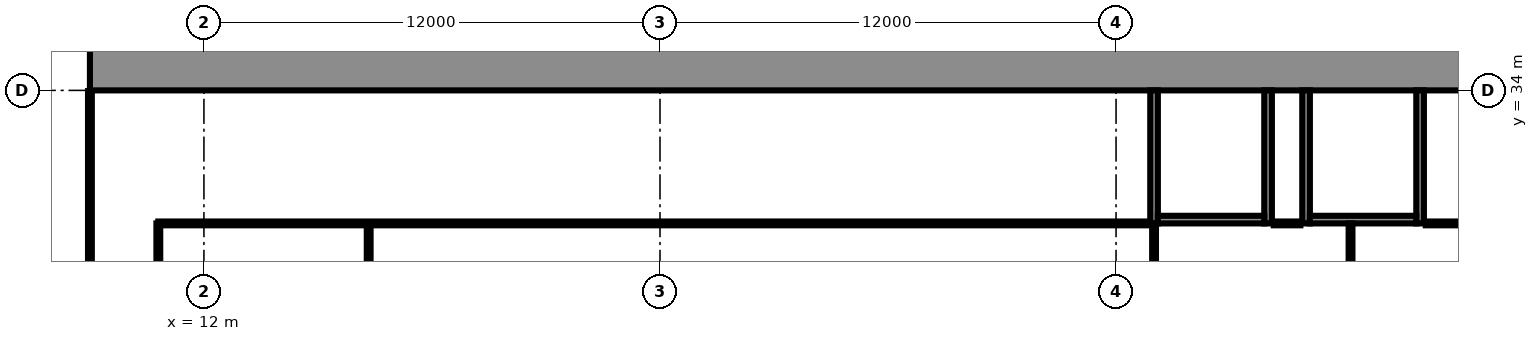
"""IFC4 building model, lengths in metres.
Left out: names, types, materials, properties, quantities, classifications, styles, units other than length and angle.
Written with IfcOpenShell. Run it as: python <this file> out.ifc"""

import sys

from ifc_helpers import new_model, si_unit, direction, frame, frame_2d, origin, place, context, subcontext, project, spatial, rectangle, extrude, element, fill, save


model = new_model("IFC4")
c1 = context("Model", 3, precision=1e-05, world=origin(), true_north=direction((0.0, 1.0)))
c2 = subcontext(c1, "Body", "Model", "MODEL_VIEW")
j1 = project(units=[si_unit("LENGTHUNIT", "METRE"), si_unit("PLANEANGLEUNIT", "RADIAN")], contexts=[c1])
p1 = place(None, origin())
s1 = spatial("IfcSite", under=j1, at=p1, CompositionType="ELEMENT")
p2 = place(p1, origin())
s2 = spatial("IfcBuilding", under=s1, at=p2, CompositionType="ELEMENT")
p3 = place(p2, frame((0.0, 0.0, 41.5)))
s3 = spatial("IfcBuildingStorey", under=s2, at=p3, CompositionType="ELEMENT", Elevation=41.5)
p4 = place(p3, frame((9.0, 34.6, 0.0), z_axis=(0.0, 0.0, 1.0), x_axis=(1.0, 0.0, 0.0)))
e1 = element("IfcWall", 1, at=p4, inside=s3, PredefinedType="SHEAR", context=c2, shape_type="SweptSolid", body=[
    extrude(rectangle(XDim=56.0, YDim=1.2, at=frame_2d((28.0, 0.0))), origin(), (0.0, 0.0, 1.0), 3.6),
])
p5 = place(p4, frame((3.3, 0.0, 0.0)))
e2 = element("IfcOpeningElement", 2, at=p5, cuts=e1, PredefinedType="OPENING", context=c2, shape_type="SweptSolid", body=[
    extrude(rectangle(XDim=1.0, YDim=2.1, at=frame_2d((0.5, 1.05))), frame((0.0, 0.61, 0.0), z_axis=(0.0, -1.0, 0.0), x_axis=(1.0, 0.0, 0.0)), (0.0, 0.0, 1.0), 1.22),
])
p6 = place(p4, frame((7.867, 0.0, 0.0)))
e3 = element("IfcOpeningElement", 3, at=p6, cuts=e1, PredefinedType="OPENING", context=c2, shape_type="SweptSolid", body=[
    extrude(rectangle(XDim=1.1, YDim=2.1, at=frame_2d((0.55, 1.05))), frame((0.0, 0.61, 0.0), z_axis=(0.0, -1.0, 0.0), x_axis=(1.0, 0.0, 0.0)), (0.0, 0.0, 1.0), 1.22),
])
p7 = place(p4, frame((12.033, 0.0, 0.0)))
e4 = element("IfcOpeningElement", 4, at=p7, cuts=e1, PredefinedType="OPENING", context=c2, shape_type="SweptSolid", body=[
    extrude(rectangle(XDim=1.1, YDim=2.1, at=frame_2d((0.55, 1.05))), frame((0.0, 0.61, 0.0), z_axis=(0.0, -1.0, 0.0), x_axis=(1.0, 0.0, 0.0)), (0.0, 0.0, 1.0), 1.22),
])
p8 = place(p4, frame((9.8, 0.0, 0.0)))
e5 = element("IfcOpeningElement", 5, at=p8, cuts=e1, PredefinedType="OPENING", context=c2, shape_type="SweptSolid", body=[
    extrude(rectangle(XDim=1.4, YDim=2.1, at=frame_2d((0.7, 1.05))), frame((0.0, 0.61, 0.0), z_axis=(0.0, -1.0, 0.0), x_axis=(1.0, 0.0, 0.0)), (0.0, 0.0, 1.0), 1.22),
])
p9 = place(p4, frame((14.65, 0.0, 0.0)))
e6 = element("IfcOpeningElement", 6, at=p9, cuts=e1, PredefinedType="OPENING", context=c2, shape_type="SweptSolid", body=[
    extrude(rectangle(XDim=1.2, YDim=2.1, at=frame_2d((0.6, 1.05))), frame((0.0, 0.61, 0.0), z_axis=(0.0, -1.0, 0.0), x_axis=(1.0, 0.0, 0.0)), (0.0, 0.0, 1.0), 1.22),
])
p10 = place(p4, frame((21.867, 0.0, 0.0)))
e7 = element("IfcOpeningElement", 7, at=p10, cuts=e1, PredefinedType="OPENING", context=c2, shape_type="SweptSolid", body=[
    extrude(rectangle(XDim=1.1, YDim=2.1, at=frame_2d((0.55, 1.05))), frame((0.0, 0.61, 0.0), z_axis=(0.0, -1.0, 0.0), x_axis=(1.0, 0.0, 0.0)), (0.0, 0.0, 1.0), 1.22),
])
p11 = place(p4, frame((26.033, 0.0, 0.0)))
e8 = element("IfcOpeningElement", 8, at=p11, cuts=e1, PredefinedType="OPENING", context=c2, shape_type="SweptSolid", body=[
    extrude(rectangle(XDim=1.1, YDim=2.1, at=frame_2d((0.55, 1.05))), frame((0.0, 0.61, 0.0), z_axis=(0.0, -1.0, 0.0), x_axis=(1.0, 0.0, 0.0)), (0.0, 0.0, 1.0), 1.22),
])
p12 = place(p4, frame((23.8, 0.0, 0.0)))
e9 = element("IfcOpeningElement", 9, at=p12, cuts=e1, PredefinedType="OPENING", context=c2, shape_type="SweptSolid", body=[
    extrude(rectangle(XDim=1.4, YDim=2.1, at=frame_2d((0.7, 1.05))), frame((0.0, 0.61, 0.0), z_axis=(0.0, -1.0, 0.0), x_axis=(1.0, 0.0, 0.0)), (0.0, 0.0, 1.0), 1.22),
])
p13 = place(p4, frame((28.867, 0.0, 0.0)))
e10 = element("IfcOpeningElement", 10, at=p13, cuts=e1, PredefinedType="OPENING", context=c2, shape_type="SweptSolid", body=[
    extrude(rectangle(XDim=1.1, YDim=2.1, at=frame_2d((0.55, 1.05))), frame((0.0, 0.61, 0.0), z_axis=(0.0, -1.0, 0.0), x_axis=(1.0, 0.0, 0.0)), (0.0, 0.0, 1.0), 1.22),
])
p14 = place(p4, frame((33.033, 0.0, 0.0)))
e11 = element("IfcOpeningElement", 11, at=p14, cuts=e1, PredefinedType="OPENING", context=c2, shape_type="SweptSolid", body=[
    extrude(rectangle(XDim=1.1, YDim=2.1, at=frame_2d((0.55, 1.05))), frame((0.0, 0.61, 0.0), z_axis=(0.0, -1.0, 0.0), x_axis=(1.0, 0.0, 0.0)), (0.0, 0.0, 1.0), 1.22),
])
p15 = place(p4, frame((40.15, 0.0, 0.0)))
e12 = element("IfcOpeningElement", 12, at=p15, cuts=e1, PredefinedType="OPENING", context=c2, shape_type="SweptSolid", body=[
    extrude(rectangle(XDim=1.2, YDim=2.1, at=frame_2d((0.6, 1.05))), frame((0.0, 0.61, 0.0), z_axis=(0.0, -1.0, 0.0), x_axis=(1.0, 0.0, 0.0)), (0.0, 0.0, 1.0), 1.22),
])
p16 = place(p4, frame((44.8, 0.0, 0.0)))
e13 = element("IfcOpeningElement", 13, at=p16, cuts=e1, PredefinedType="OPENING", context=c2, shape_type="SweptSolid", body=[
    extrude(rectangle(XDim=1.4, YDim=2.1, at=frame_2d((0.7, 1.05))), frame((0.0, 0.61, 0.0), z_axis=(0.0, -1.0, 0.0), x_axis=(1.0, 0.0, 0.0)), (0.0, 0.0, 1.0), 1.22),
])
p17 = place(p4, frame((49.867, 0.0, 0.0)))
e14 = element("IfcOpeningElement", 14, at=p17, cuts=e1, PredefinedType="OPENING", context=c2, shape_type="SweptSolid", body=[
    extrude(rectangle(XDim=1.1, YDim=2.1, at=frame_2d((0.55, 1.05))), frame((0.0, 0.61, 0.0), z_axis=(0.0, -1.0, 0.0), x_axis=(1.0, 0.0, 0.0)), (0.0, 0.0, 1.0), 1.22),
])
p18 = place(p4, frame((53.5, 0.0, 0.0)))
e15 = element("IfcOpeningElement", 15, at=p18, cuts=e1, PredefinedType="OPENING", context=c2, shape_type="SweptSolid", body=[
    extrude(rectangle(XDim=1.1, YDim=2.1, at=frame_2d((0.55, 1.05))), frame((0.0, 0.61, 0.0), z_axis=(0.0, -1.0, 0.0), x_axis=(1.0, 0.0, 0.0)), (0.0, 0.0, 1.0), 1.22),
])
p19 = place(p4, frame((51.567, 0.0, 0.0)))
e16 = element("IfcOpeningElement", 16, at=p19, cuts=e1, PredefinedType="OPENING", context=c2, shape_type="SweptSolid", body=[
    extrude(rectangle(XDim=1.4, YDim=2.1, at=frame_2d((0.7, 1.05))), frame((0.0, 0.61, 0.0), z_axis=(0.0, -1.0, 0.0), x_axis=(1.0, 0.0, 0.0)), (0.0, 0.0, 1.0), 1.22),
])
p20 = place(p3, frame((37.0, 30.5, 0.0), z_axis=(0.0, 0.0, 1.0), x_axis=(0.0, 1.0, 0.0)))
e17 = element("IfcWall", 17, at=p20, inside=s3, PredefinedType="PARTITIONING", context=c2, shape_type="SweptSolid", body=[
    extrude(rectangle(XDim=3.5, YDim=0.2, at=frame_2d((1.75, 0.0))), origin(), (0.0, 0.0, 1.0), 3.2),
])
p21 = place(p20, frame((1.2, 0.0, 0.0)))
e18 = element("IfcOpeningElement", 18, at=p21, cuts=e17, PredefinedType="OPENING", context=c2, shape_type="SweptSolid", body=[
    extrude(rectangle(XDim=1.1, YDim=2.1, at=frame_2d((0.55, 1.05))), frame((0.0, 0.11, 0.0), z_axis=(0.0, -1.0, 0.0), x_axis=(1.0, 0.0, 0.0)), (0.0, 0.0, 1.0), 0.22),
])
p22 = place(p3, frame((40.0, 30.5, 0.0), z_axis=(0.0, 0.0, 1.0), x_axis=(0.0, 1.0, 0.0)))
e19 = element("IfcWall", 19, at=p22, inside=s3, PredefinedType="PARTITIONING", context=c2, shape_type="SweptSolid", body=[
    extrude(rectangle(XDim=3.5, YDim=0.2, at=frame_2d((1.75, 0.0))), origin(), (0.0, 0.0, 1.0), 3.2),
])
p23 = place(p3, frame((37.1, 30.6, 0.0), z_axis=(0.0, 0.0, 1.0), x_axis=(1.0, 0.0, 0.0)))
e20 = element("IfcWall", 20, at=p23, inside=s3, PredefinedType="PARTITIONING", context=c2, shape_type="SweptSolid", body=[
    extrude(rectangle(XDim=2.8, YDim=0.2, at=frame_2d((1.4, 0.0))), origin(), (0.0, 0.0, 1.0), 3.2),
])
p24 = place(p3, frame((41.0, 30.5, 0.0), z_axis=(0.0, 0.0, 1.0), x_axis=(0.0, 1.0, 0.0)))
e21 = element("IfcWall", 21, at=p24, inside=s3, PredefinedType="PARTITIONING", context=c2, shape_type="SweptSolid", body=[
    extrude(rectangle(XDim=3.5, YDim=0.2, at=frame_2d((1.75, 0.0))), origin(), (0.0, 0.0, 1.0), 3.2),
])
p25 = place(p3, frame((44.0, 30.5, 0.0), z_axis=(0.0, 0.0, 1.0), x_axis=(0.0, 1.0, 0.0)))
e22 = element("IfcWall", 22, at=p25, inside=s3, PredefinedType="PARTITIONING", context=c2, shape_type="SweptSolid", body=[
    extrude(rectangle(XDim=3.5, YDim=0.2, at=frame_2d((1.75, 0.0))), origin(), (0.0, 0.0, 1.0), 3.2),
])
p26 = place(p25, frame((1.2, 0.0, 0.0)))
e23 = element("IfcOpeningElement", 23, at=p26, cuts=e22, PredefinedType="OPENING", context=c2, shape_type="SweptSolid", body=[
    extrude(rectangle(XDim=1.1, YDim=2.1, at=frame_2d((0.55, 1.05))), frame((0.0, 0.11, 0.0), z_axis=(0.0, -1.0, 0.0), x_axis=(1.0, 0.0, 0.0)), (0.0, 0.0, 1.0), 0.22),
])
p27 = place(p3, frame((41.1, 30.6, 0.0), z_axis=(0.0, 0.0, 1.0), x_axis=(1.0, 0.0, 0.0)))
e24 = element("IfcWall", 24, at=p27, inside=s3, PredefinedType="PARTITIONING", context=c2, shape_type="SweptSolid", body=[
    extrude(rectangle(XDim=2.8, YDim=0.2, at=frame_2d((1.4, 0.0))), origin(), (0.0, 0.0, 1.0), 3.2),
])
p28 = place(p3, frame((9.0, 26.02, 0.0), z_axis=(0.0, 0.0, 1.0), x_axis=(0.0, 1.0, 0.0)))
e25 = element("IfcWall", 25, at=p28, inside=s3, PredefinedType="PARTITIONING", context=c2, shape_type="SweptSolid", body=[
    extrude(rectangle(XDim=7.96, YDim=0.1, at=frame_2d((3.98, 0.0))), origin(), (0.0, 0.0, 1.0), 3.2),
])
p29 = place(p28, frame((3.56, 0.0, 0.0)))
e26 = element("IfcOpeningElement", 26, at=p29, cuts=e25, PredefinedType="OPENING", context=c2, shape_type="SweptSolid", body=[
    extrude(rectangle(XDim=1.0, YDim=2.1, at=frame_2d((0.5, 1.05))), frame((0.0, 0.06, 0.0), z_axis=(0.0, -1.0, 0.0), x_axis=(1.0, 0.0, 0.0)), (0.0, 0.0, 1.0), 0.12),
])
p30 = place(p3, frame((10.8, 23.55, 0.0), z_axis=(0.0, 0.0, 1.0), x_axis=(0.0, 1.0, 0.0)))
e27 = element("IfcWall", 27, at=p30, inside=s3, PredefinedType="PARTITIONING", context=c2, shape_type="SweptSolid", body=[
    extrude(rectangle(XDim=6.95, YDim=0.1, at=frame_2d((3.475, 0.0))), origin(), (0.0, 0.0, 1.0), 3.2),
])
p31 = place(p30, frame((0.308, 0.0, 0.0)))
e28 = element("IfcOpeningElement", 28, at=p31, cuts=e27, PredefinedType="OPENING", context=c2, shape_type="SweptSolid", body=[
    extrude(rectangle(XDim=1.0, YDim=2.1, at=frame_2d((0.5, 1.05))), frame((0.0, 0.06, 0.0), z_axis=(0.0, -1.0, 0.0), x_axis=(1.0, 0.0, 0.0)), (0.0, 0.0, 1.0), 0.12),
])
p32 = place(p3, frame((10.8, 30.5, 0.0), z_axis=(0.0, 0.0, 1.0), x_axis=(1.0, 0.0, 0.0)))
e29 = element("IfcWall", 29, at=p32, inside=s3, PredefinedType="PARTITIONING", context=c2, shape_type="SweptSolid", body=[
    extrude(rectangle(XDim=26.05, YDim=0.1, at=frame_2d((13.025, 0.0))), origin(), (0.0, 0.0, 1.0), 3.2),
])
p33 = place(p32, frame((0.235, 0.0, 0.0)))
e30 = element("IfcOpeningElement", 30, at=p33, cuts=e29, PredefinedType="OPENING", context=c2, shape_type="SweptSolid", body=[
    extrude(rectangle(XDim=1.0, YDim=2.1, at=frame_2d((0.5, 1.05))), frame((0.0, 0.06, 0.0), z_axis=(0.0, -1.0, 0.0), x_axis=(1.0, 0.0, 0.0)), (0.0, 0.0, 1.0), 0.12),
])
p34 = place(p32, frame((10.955, 0.0, 0.0)))
e31 = element("IfcOpeningElement", 31, at=p34, cuts=e29, PredefinedType="OPENING", context=c2, shape_type="SweptSolid", body=[
    extrude(rectangle(XDim=1.0, YDim=2.1, at=frame_2d((0.5, 1.05))), frame((0.0, 0.06, 0.0), z_axis=(0.0, -1.0, 0.0), x_axis=(1.0, 0.0, 0.0)), (0.0, 0.0, 1.0), 0.12),
])
for number, where, z_axis, x_axis in (
    (32, (16.335, 14.24, 0.0), (0.0, 0.0, 1.0), (0.0, 1.0, 0.0)),
    (33, (20.335, 14.24, 0.0), (0.0, 0.0, 1.0), (0.0, 1.0, 0.0)),
):
    element("IfcWall", number, at=place(p3, frame(where, z_axis=z_axis, x_axis=x_axis)), inside=s3, PredefinedType="PARTITIONING", context=c2, shape_type="SweptSolid", body=[
        extrude(rectangle(XDim=16.26, YDim=0.1, at=frame_2d((8.13, 0.0))), origin(), (0.0, 0.0, 1.0), 3.2),
    ])
p35 = place(p3, frame((24.335, 14.24, 0.0), z_axis=(0.0, 0.0, 1.0), x_axis=(0.0, 1.0, 0.0)))
e34 = element("IfcWall", 34, at=p35, inside=s3, PredefinedType="PARTITIONING", context=c2, shape_type="SweptSolid", body=[
    extrude(rectangle(XDim=16.25, YDim=0.1, at=frame_2d((8.125, 0.0))), origin(), (0.0, 0.0, 1.0), 3.2),
])
for number, where, z_axis, x_axis in (
    (35, (37.0, 14.24, 0.0), (0.0, 0.0, 1.0), (0.0, 1.0, 0.0)),
    (36, (42.17, 14.24, 0.0), (0.0, 0.0, 1.0), (0.0, 1.0, 0.0)),
):
    element("IfcWall", number, at=place(p3, frame(where, z_axis=z_axis, x_axis=x_axis)), inside=s3, PredefinedType="PARTITIONING", context=c2, shape_type="SweptSolid", body=[
        extrude(rectangle(XDim=16.26, YDim=0.1, at=frame_2d((8.13, 0.0))), origin(), (0.0, 0.0, 1.0), 3.2),
    ])
p36 = place(p3, frame((40.15, 30.5, 0.0), z_axis=(0.0, 0.0, 1.0), x_axis=(1.0, 0.0, 0.0)))
e37 = element("IfcWall", 37, at=p36, inside=s3, PredefinedType="PARTITIONING", context=c2, shape_type="SweptSolid", body=[
    extrude(rectangle(XDim=0.7, YDim=0.1, at=frame_2d((0.35, 0.0))), origin(), (0.0, 0.0, 1.0), 3.2),
])
p37 = place(p3, frame((44.15, 30.5, 0.0), z_axis=(0.0, 0.0, 1.0), x_axis=(1.0, 0.0, 0.0)))
e38 = element("IfcWall", 38, at=p37, inside=s3, PredefinedType="PARTITIONING", context=c2, shape_type="SweptSolid", body=[
    extrude(rectangle(XDim=19.42, YDim=0.1, at=frame_2d((9.71, 0.0))), origin(), (0.0, 0.0, 1.0), 3.2),
])
p38 = place(p37, frame((15.54, 0.0, 0.0)))
e39 = element("IfcOpeningElement", 39, at=p38, cuts=e38, PredefinedType="OPENING", context=c2, shape_type="SweptSolid", body=[
    extrude(rectangle(XDim=1.0, YDim=2.1, at=frame_2d((0.5, 1.05))), frame((0.0, 0.06, 0.0), z_axis=(0.0, -1.0, 0.0), x_axis=(1.0, 0.0, 0.0)), (0.0, 0.0, 1.0), 0.12),
])
p39 = place(p5, origin())
e40 = element("IfcDoor", 40, at=p39, inside=s3, OperationType="SINGLE_SWING_LEFT", PredefinedType="DOOR", context=c2, shape_type="SweptSolid", body=[
    extrude(rectangle(XDim=1.0, YDim=2.1, at=frame_2d((0.5, 1.05))), frame((0.0, 0.6, 0.0), z_axis=(0.0, -1.0, 0.0), x_axis=(1.0, 0.0, 0.0)), (0.0, 0.0, 1.0), 1.199),
])
fill(e2, e40)
p40 = place(p6, origin())
e41 = element("IfcDoor", 41, at=p40, inside=s3, OperationType="DOUBLE_DOOR_SLIDING", PredefinedType="DOOR", context=c2, shape_type="SweptSolid", body=[
    extrude(rectangle(XDim=1.1, YDim=2.1, at=frame_2d((0.55, 1.05))), frame((0.0, 0.025, 0.0), z_axis=(0.0, -1.0, 0.0), x_axis=(1.0, 0.0, 0.0)), (0.0, 0.0, 1.0), 0.05),
])
fill(e3, e41)
p41 = place(p7, origin())
e42 = element("IfcDoor", 42, at=p41, inside=s3, OperationType="DOUBLE_DOOR_SLIDING", PredefinedType="DOOR", context=c2, shape_type="SweptSolid", body=[
    extrude(rectangle(XDim=1.1, YDim=2.1, at=frame_2d((0.55, 1.05))), frame((0.0, 0.025, 0.0), z_axis=(0.0, -1.0, 0.0), x_axis=(1.0, 0.0, 0.0)), (0.0, 0.0, 1.0), 0.05),
])
fill(e4, e42)
p42 = place(p8, origin())
e43 = element("IfcDoor", 43, at=p42, inside=s3, OperationType="DOUBLE_DOOR_SINGLE_SWING", PredefinedType="DOOR", context=c2, shape_type="SweptSolid", body=[
    extrude(rectangle(XDim=1.4, YDim=2.1, at=frame_2d((0.7, 1.05))), frame((0.0, 0.025, 0.0), z_axis=(0.0, -1.0, 0.0), x_axis=(1.0, 0.0, 0.0)), (0.0, 0.0, 1.0), 0.05),
])
fill(e5, e43)
p43 = place(p9, origin())
e44 = element("IfcDoor", 44, at=p43, inside=s3, OperationType="SINGLE_SWING_LEFT", PredefinedType="DOOR", context=c2, shape_type="SweptSolid", body=[
    extrude(rectangle(XDim=1.2, YDim=2.1, at=frame_2d((0.6, 1.05))), frame((0.0, 0.025, 0.0), z_axis=(0.0, -1.0, 0.0), x_axis=(1.0, 0.0, 0.0)), (0.0, 0.0, 1.0), 0.05),
])
fill(e6, e44)
p44 = place(p10, origin())
e45 = element("IfcDoor", 45, at=p44, inside=s3, OperationType="DOUBLE_DOOR_SLIDING", PredefinedType="DOOR", context=c2, shape_type="SweptSolid", body=[
    extrude(rectangle(XDim=1.1, YDim=2.1, at=frame_2d((0.55, 1.05))), frame((0.0, 0.025, 0.0), z_axis=(0.0, -1.0, 0.0), x_axis=(1.0, 0.0, 0.0)), (0.0, 0.0, 1.0), 0.05),
])
fill(e7, e45)
p45 = place(p11, origin())
e46 = element("IfcDoor", 46, at=p45, inside=s3, OperationType="DOUBLE_DOOR_SLIDING", PredefinedType="DOOR", context=c2, shape_type="SweptSolid", body=[
    extrude(rectangle(XDim=1.1, YDim=2.1, at=frame_2d((0.55, 1.05))), frame((0.0, 0.025, 0.0), z_axis=(0.0, -1.0, 0.0), x_axis=(1.0, 0.0, 0.0)), (0.0, 0.0, 1.0), 0.05),
])
fill(e8, e46)
p46 = place(p12, origin())
e47 = element("IfcDoor", 47, at=p46, inside=s3, OperationType="DOUBLE_DOOR_SINGLE_SWING", PredefinedType="DOOR", context=c2, shape_type="SweptSolid", body=[
    extrude(rectangle(XDim=1.4, YDim=2.1, at=frame_2d((0.7, 1.05))), frame((0.0, 0.025, 0.0), z_axis=(0.0, -1.0, 0.0), x_axis=(1.0, 0.0, 0.0)), (0.0, 0.0, 1.0), 0.05),
])
fill(e9, e47)
p47 = place(p13, origin())
e48 = element("IfcDoor", 48, at=p47, inside=s3, OperationType="DOUBLE_DOOR_SLIDING", PredefinedType="DOOR", context=c2, shape_type="SweptSolid", body=[
    extrude(rectangle(XDim=1.1, YDim=2.1, at=frame_2d((0.55, 1.05))), frame((0.0, 0.025, 0.0), z_axis=(0.0, -1.0, 0.0), x_axis=(1.0, 0.0, 0.0)), (0.0, 0.0, 1.0), 0.05),
])
fill(e10, e48)
p48 = place(p14, origin())
e49 = element("IfcDoor", 49, at=p48, inside=s3, OperationType="DOUBLE_DOOR_SLIDING", PredefinedType="DOOR", context=c2, shape_type="SweptSolid", body=[
    extrude(rectangle(XDim=1.1, YDim=2.1, at=frame_2d((0.55, 1.05))), frame((0.0, 0.025, 0.0), z_axis=(0.0, -1.0, 0.0), x_axis=(1.0, 0.0, 0.0)), (0.0, 0.0, 1.0), 0.05),
])
fill(e11, e49)
p49 = place(p21, origin())
e50 = element("IfcDoor", 50, at=p49, inside=s3, OperationType="SINGLE_SWING_LEFT", PredefinedType="DOOR", context=c2, shape_type="SweptSolid", body=[
    extrude(rectangle(XDim=1.1, YDim=2.1, at=frame_2d((0.55, 1.05))), frame((0.0, 0.025, 0.0), z_axis=(0.0, -1.0, 0.0), x_axis=(1.0, 0.0, 0.0)), (0.0, 0.0, 1.0), 0.05),
])
fill(e18, e50)
p50 = place(p26, origin())
e51 = element("IfcDoor", 51, at=p50, inside=s3, OperationType="SINGLE_SWING_LEFT", PredefinedType="DOOR", context=c2, shape_type="SweptSolid", body=[
    extrude(rectangle(XDim=1.1, YDim=2.1, at=frame_2d((0.55, 1.05))), frame((0.0, 0.025, 0.0), z_axis=(0.0, -1.0, 0.0), x_axis=(1.0, 0.0, 0.0)), (0.0, 0.0, 1.0), 0.05),
])
fill(e23, e51)
p51 = place(p29, origin())
e52 = element("IfcDoor", 52, at=p51, inside=s3, OperationType="SINGLE_SWING_RIGHT", PredefinedType="DOOR", context=c2, shape_type="SweptSolid", body=[
    extrude(rectangle(XDim=1.0, YDim=2.1, at=frame_2d((0.5, 1.05))), frame((0.0, 0.025, 0.0), z_axis=(0.0, -1.0, 0.0), x_axis=(1.0, 0.0, 0.0)), (0.0, 0.0, 1.0), 0.05),
])
fill(e26, e52)
p52 = place(p33, origin())
e53 = element("IfcDoor", 53, at=p52, inside=s3, OperationType="SINGLE_SWING_LEFT", PredefinedType="DOOR", context=c2, shape_type="SweptSolid", body=[
    extrude(rectangle(XDim=1.0, YDim=2.1, at=frame_2d((0.5, 1.05))), frame((0.0, 0.025, 0.0), z_axis=(0.0, -1.0, 0.0), x_axis=(1.0, 0.0, 0.0)), (0.0, 0.0, 1.0), 0.05),
])
fill(e30, e53)
p53 = place(p34, origin())
e54 = element("IfcDoor", 54, at=p53, inside=s3, OperationType="SINGLE_SWING_LEFT", PredefinedType="DOOR", context=c2, shape_type="SweptSolid", body=[
    extrude(rectangle(XDim=1.0, YDim=2.1, at=frame_2d((0.5, 1.05))), frame((0.0, 0.025, 0.0), z_axis=(0.0, -1.0, 0.0), x_axis=(1.0, 0.0, 0.0)), (0.0, 0.0, 1.0), 0.05),
])
fill(e31, e54)
save(model, sys.argv[1])
